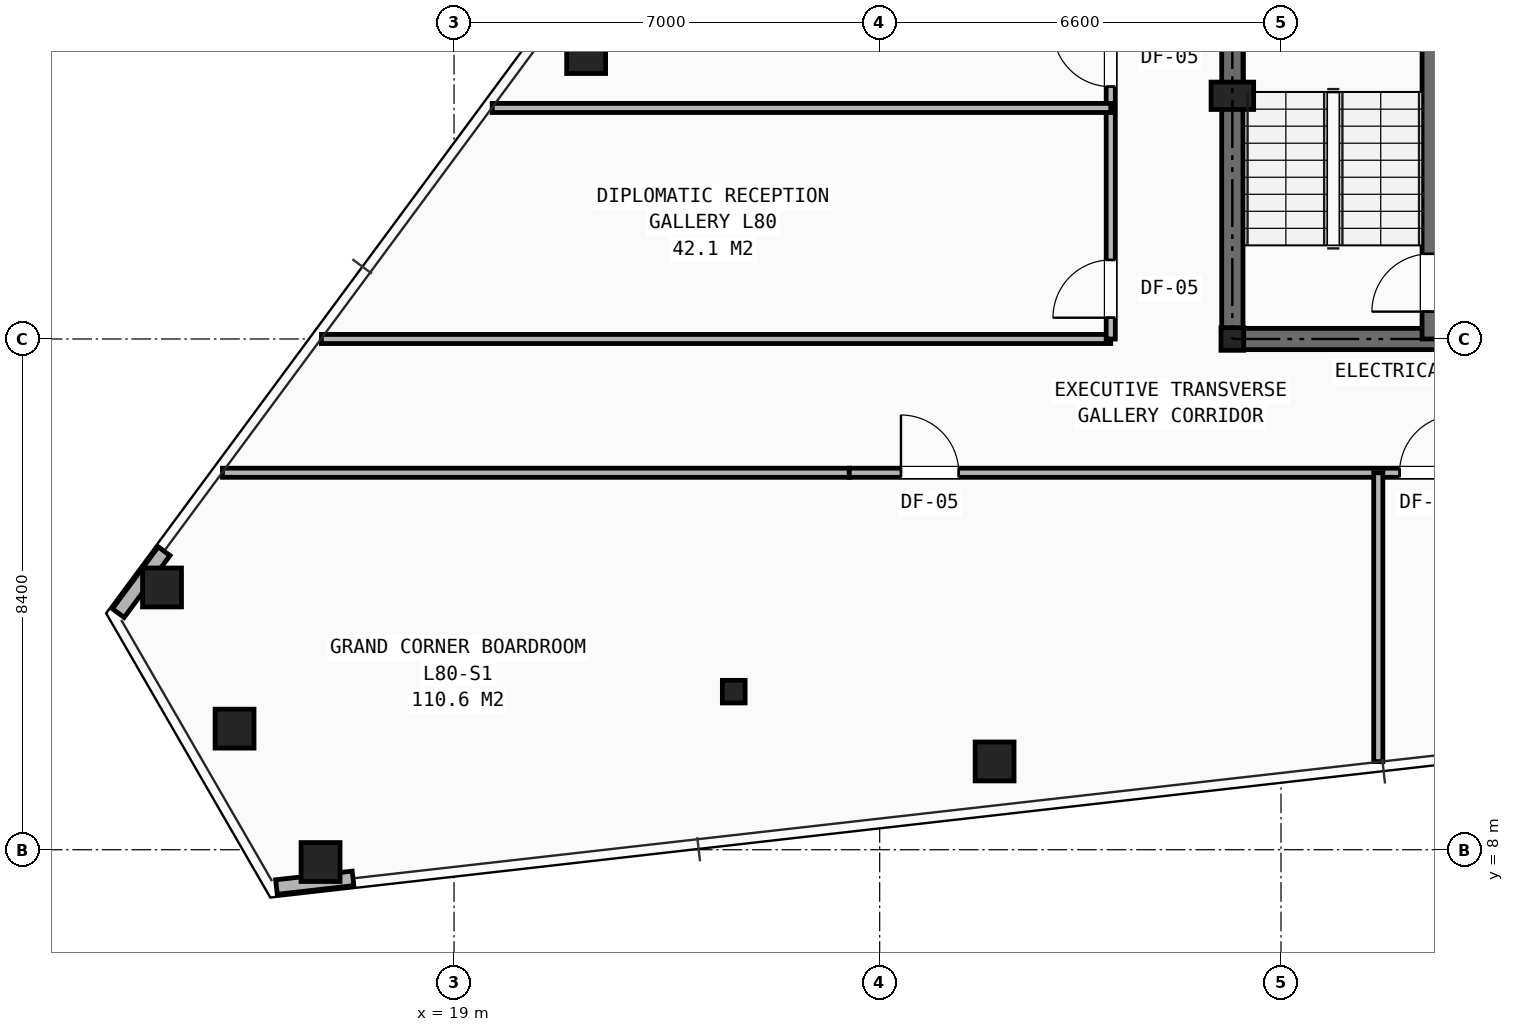
"""IFC4 building model, lengths in metres.
Left out: names, types, materials, properties, quantities, classifications, styles, units other than length and angle.
Written with IfcOpenShell. Run it as: python <this file> out.ifc"""

import sys

from ifc_helpers import new_model, si_unit, direction, frame, frame_2d, origin, origin_2d, place, context, subcontext, project, spatial, rectangle, hollow_rectangle, i_section, extrude, element, fill, save


model = new_model("IFC4")
c1 = context("Model", 3, precision=1e-05, world=origin(), true_north=direction((0.0, 1.0)))
c2 = subcontext(c1, "Body", "Model", "MODEL_VIEW")
j1 = project(units=[si_unit("LENGTHUNIT", "METRE"), si_unit("PLANEANGLEUNIT", "RADIAN")], contexts=[c1])
p1 = place(None, origin())
s1 = spatial("IfcSite", under=j1, at=p1, CompositionType="ELEMENT")
p2 = place(p1, origin())
s2 = spatial("IfcBuilding", under=s1, at=p2, CompositionType="ELEMENT")
p3 = place(p2, frame((0.0, 0.0, 283.0)))
s3 = spatial("IfcBuildingStorey", under=s2, at=p3, CompositionType="ELEMENT", Elevation=283.0)
for number, where, z_axis, x_axis in (
    (1, (31.8, 16.4, 0.0), (0.0, 0.0, 1.0), (1.0, 0.0, 0.0)),
    (2, (23.6, 10.6, 0.0), (0.0, 0.0, 1.0), (1.0, 0.0, 0.0)),
):
    element("IfcColumn", number, at=place(p3, frame(where, z_axis=z_axis, x_axis=x_axis)), inside=s3, PredefinedType="COLUMN", context=c2, shape_type="SweptSolid", body=[
        extrude(i_section(OverallWidth=0.374, OverallDepth=0.372, WebThickness=0.016, FlangeThickness=0.026, at=origin_2d()), origin(), (0.0, 0.0, 1.0), 3.5),
    ])
p4 = place(p3, frame((31.8, 20.4, 0.0), z_axis=(0.0, 0.0, 1.0), x_axis=(1.0, 0.0, 0.0)))
e3 = element("IfcColumn", 3, at=p4, inside=s3, PredefinedType="PILASTER", context=c2, shape_type="SweptSolid", body=[
    extrude(rectangle(XDim=0.7, YDim=0.45, at=origin_2d()), origin(), (0.0, 0.0, 1.0), 3.5),
])
for number, where, z_axis, x_axis in (
    (4, (21.173, 21.086, 0.0), (0.0, 0.0, 1.0), (1.0, 0.0, 0.0)),
    (5, (14.198, 12.313, 0.0), (0.0, 0.0, 1.0), (1.0, 0.0, 0.0)),
    (6, (15.39, 9.992, 0.0), (0.0, 0.0, 1.0), (1.0, 0.0, 0.0)),
    (7, (16.805, 7.798, 0.0), (0.0, 0.0, 1.0), (1.0, 0.0, 0.0)),
    (8, (27.89, 9.452, 0.0), (0.0, 0.0, 1.0), (1.0, 0.0, 0.0)),
):
    element("IfcColumn", number, at=place(p3, frame(where, z_axis=z_axis, x_axis=x_axis)), inside=s3, PredefinedType="COLUMN", context=c2, shape_type="SweptSolid", body=[
        extrude(hollow_rectangle(XDim=0.64, YDim=0.64, WallThickness=0.045, at=origin_2d()), origin(), (0.0, 0.0, 1.0), 3.5),
    ])
p5 = place(p3, frame((14.232, 12.91, 0.0), z_axis=(0.0, 0.0, 1.0), x_axis=(-0.594499388503, -0.804096062091, 0.0)))
e9 = element("IfcWall", 9, at=p5, inside=s3, PredefinedType="SHEAR", context=c2, shape_type="SweptSolid", body=[
    extrude(rectangle(XDim=1.267, YDim=0.24, at=frame_2d((0.634, 0.0))), origin(), (0.0, 0.0, 1.0), 2.623),
])
p6 = place(p3, frame((16.079, 7.386, 0.0), z_axis=(0.0, 0.0, 1.0), x_axis=(0.993610655419, 0.11286215237, 0.0)))
e10 = element("IfcWall", 10, at=p6, inside=s3, PredefinedType="SHEAR", context=c2, shape_type="SweptSolid", body=[
    extrude(rectangle(XDim=1.268, YDim=0.24, at=frame_2d((0.634, 0.0))), origin(), (0.0, 0.0, 1.0), 2.623),
])
p7 = place(p3, frame((31.8, 16.4, 0.0), z_axis=(0.0, 0.0, 1.0), x_axis=(1.0, 0.0, 0.0)))
e11 = element("IfcWall", 11, at=p7, inside=s3, PredefinedType="SHEAR", context=c2, shape_type="SweptSolid", body=[
    extrude(rectangle(XDim=16.4, YDim=0.35, at=frame_2d((8.2, 0.0))), origin(), (0.0, 0.0, 1.0), 3.25),
])
p8 = place(p7, frame((7.75, 0.0, 0.0)))
e12 = element("IfcOpeningElement", 12, at=p8, cuts=e11, PredefinedType="OPENING", context=c2, shape_type="SweptSolid", body=[
    extrude(rectangle(XDim=0.9, YDim=2.1, at=frame_2d((0.45, 1.05))), frame((0.0, 0.185, 0.0), z_axis=(0.0, -1.0, 0.0), x_axis=(1.0, 0.0, 0.0)), (0.0, 0.0, 1.0), 0.37),
])
p9 = place(p7, frame((4.2, 0.0, 0.0)))
e13 = element("IfcOpeningElement", 13, at=p9, cuts=e11, PredefinedType="OPENING", context=c2, shape_type="SweptSolid", body=[
    extrude(rectangle(XDim=0.95, YDim=2.1, at=frame_2d((0.475, 1.05))), frame((0.0, 0.185, 0.0), z_axis=(0.0, -1.0, 0.0), x_axis=(1.0, 0.0, 0.0)), (0.0, 0.0, 1.0), 0.37),
])
p10 = place(p7, frame((10.6, 0.0, 0.0)))
e14 = element("IfcOpeningElement", 14, at=p10, cuts=e11, PredefinedType="OPENING", context=c2, shape_type="SweptSolid", body=[
    extrude(rectangle(XDim=0.95, YDim=2.1, at=frame_2d((0.475, 1.05))), frame((0.0, 0.185, 0.0), z_axis=(0.0, -1.0, 0.0), x_axis=(1.0, 0.0, 0.0)), (0.0, 0.0, 1.0), 0.37),
])
p11 = place(p3, frame((31.8, 16.4, 0.0), z_axis=(0.0, 0.0, 1.0), x_axis=(0.0, 1.0, 0.0)))
e15 = element("IfcWall", 15, at=p11, inside=s3, PredefinedType="SHEAR", context=c2, shape_type="SweptSolid", body=[
    extrude(rectangle(XDim=14.8, YDim=0.35, at=frame_2d((7.4, 0.0))), origin(), (0.0, 0.0, 1.0), 3.25),
])
p12 = place(p11, frame((11.0, 0.0, 0.0)))
e16 = element("IfcOpeningElement", 16, at=p12, cuts=e15, PredefinedType="OPENING", context=c2, shape_type="SweptSolid", body=[
    extrude(rectangle(XDim=1.1, YDim=2.15, at=frame_2d((0.55, 1.075))), frame((0.0, 0.185, 0.0), z_axis=(0.0, -1.0, 0.0), x_axis=(1.0, 0.0, 0.0)), (0.0, 0.0, 1.0), 0.37),
])
p13 = place(p3, frame((35.045, 16.4, 0.0), z_axis=(0.0, 0.0, 1.0), x_axis=(0.0, 1.0, 0.0)))
e17 = element("IfcWall", 17, at=p13, inside=s3, PredefinedType="SHEAR", context=c2, shape_type="SweptSolid", body=[
    extrude(rectangle(XDim=8.4, YDim=0.25, at=frame_2d((4.2, 0.0))), origin(), (0.0, 0.0, 1.0), 3.25),
])
p14 = place(p13, frame((0.45, 0.0, 0.0)))
e18 = element("IfcOpeningElement", 18, at=p14, cuts=e17, PredefinedType="OPENING", context=c2, shape_type="SweptSolid", body=[
    extrude(rectangle(XDim=0.95, YDim=2.1, at=frame_2d((0.475, 1.05))), frame((0.0, 0.135, 0.0), z_axis=(0.0, -1.0, 0.0), x_axis=(1.0, 0.0, 0.0)), (0.0, 0.0, 1.0), 0.27),
])
p15 = place(p3, frame((15.192, 14.2, 0.0), z_axis=(0.0, 0.0, 1.0), x_axis=(1.0, 0.0, 0.0)))
e19 = element("IfcWall", 19, at=p15, inside=s3, PredefinedType="PARTITIONING", context=c2, shape_type="SweptSolid", body=[
    extrude(rectangle(XDim=10.308, YDim=0.15, at=frame_2d((5.154, 0.0))), origin(), (0.0, 0.0, 1.0), 2.265),
])
p16 = place(p3, frame((16.818, 16.4, 0.0), z_axis=(0.0, 0.0, 1.0), x_axis=(1.0, 0.0, 0.0)))
e20 = element("IfcWall", 20, at=p16, inside=s3, PredefinedType="PARTITIONING", context=c2, shape_type="SweptSolid", body=[
    extrude(rectangle(XDim=12.982, YDim=0.15, at=frame_2d((6.491, 0.0))), origin(), (0.0, 0.0, 1.0), 2.265),
])
p17 = place(p3, frame((29.8, 16.4, 0.0), z_axis=(0.0, 0.0, 1.0), x_axis=(0.0, 1.0, 0.0)))
e21 = element("IfcWall", 21, at=p17, inside=s3, PredefinedType="PARTITIONING", context=c2, shape_type="SweptSolid", body=[
    extrude(rectangle(XDim=19.3, YDim=0.15, at=frame_2d((9.65, 0.0))), origin(), (0.0, 0.0, 1.0), 2.265),
])
p18 = place(p17, frame((0.35, 0.0, 0.0)))
e22 = element("IfcOpeningElement", 22, at=p18, cuts=e21, PredefinedType="OPENING", context=c2, shape_type="SweptSolid", body=[
    extrude(rectangle(XDim=0.95, YDim=2.1, at=frame_2d((0.475, 1.05))), frame((0.0, 0.085, 0.0), z_axis=(0.0, -1.0, 0.0), x_axis=(1.0, 0.0, 0.0)), (0.0, 0.0, 1.0), 0.17),
])
p19 = place(p17, frame((4.15, 0.0, 0.0)))
e23 = element("IfcOpeningElement", 23, at=p19, cuts=e21, PredefinedType="OPENING", context=c2, shape_type="SweptSolid", body=[
    extrude(rectangle(XDim=0.95, YDim=2.1, at=frame_2d((0.475, 1.05))), frame((0.0, 0.085, 0.0), z_axis=(0.0, -1.0, 0.0), x_axis=(1.0, 0.0, 0.0)), (0.0, 0.0, 1.0), 0.17),
])
p20 = place(p17, frame((9.45, 0.0, 0.0)))
e24 = element("IfcOpeningElement", 24, at=p20, cuts=e21, PredefinedType="OPENING", context=c2, shape_type="SweptSolid", body=[
    extrude(rectangle(XDim=0.95, YDim=2.1, at=frame_2d((0.475, 1.05))), frame((0.0, 0.085, 0.0), z_axis=(0.0, -1.0, 0.0), x_axis=(1.0, 0.0, 0.0)), (0.0, 0.0, 1.0), 0.17),
])
p21 = place(p3, frame((25.5, 14.2, 0.0), z_axis=(0.0, 0.0, 1.0), x_axis=(1.0, 0.0, 0.0)))
e25 = element("IfcWall", 25, at=p21, inside=s3, PredefinedType="PARTITIONING", context=c2, shape_type="SweptSolid", body=[
    extrude(rectangle(XDim=29.0, YDim=0.15, at=frame_2d((14.5, 0.0))), origin(), (0.0, 0.0, 1.0), 2.265),
])
p22 = place(p21, frame((0.85, 0.0, 0.0)))
e26 = element("IfcOpeningElement", 26, at=p22, cuts=e25, PredefinedType="OPENING", context=c2, shape_type="SweptSolid", body=[
    extrude(rectangle(XDim=0.95, YDim=2.1, at=frame_2d((0.475, 1.05))), frame((0.0, 0.085, 0.0), z_axis=(0.0, -1.0, 0.0), x_axis=(1.0, 0.0, 0.0)), (0.0, 0.0, 1.0), 0.17),
])
p23 = place(p21, frame((9.05, 0.0, 0.0)))
e27 = element("IfcOpeningElement", 27, at=p23, cuts=e25, PredefinedType="OPENING", context=c2, shape_type="SweptSolid", body=[
    extrude(rectangle(XDim=0.95, YDim=2.1, at=frame_2d((0.475, 1.05))), frame((0.0, 0.085, 0.0), z_axis=(0.0, -1.0, 0.0), x_axis=(1.0, 0.0, 0.0)), (0.0, 0.0, 1.0), 0.17),
])
p24 = place(p21, frame((14.45, 0.0, 0.0)))
e28 = element("IfcOpeningElement", 28, at=p24, cuts=e25, PredefinedType="OPENING", context=c2, shape_type="SweptSolid", body=[
    extrude(rectangle(XDim=0.95, YDim=2.1, at=frame_2d((0.475, 1.05))), frame((0.0, 0.085, 0.0), z_axis=(0.0, -1.0, 0.0), x_axis=(1.0, 0.0, 0.0)), (0.0, 0.0, 1.0), 0.17),
])
p25 = place(p21, frame((18.85, 0.0, 0.0)))
e29 = element("IfcOpeningElement", 29, at=p25, cuts=e25, PredefinedType="OPENING", context=c2, shape_type="SweptSolid", body=[
    extrude(rectangle(XDim=0.95, YDim=2.1, at=frame_2d((0.475, 1.05))), frame((0.0, 0.085, 0.0), z_axis=(0.0, -1.0, 0.0), x_axis=(1.0, 0.0, 0.0)), (0.0, 0.0, 1.0), 0.17),
])
p26 = place(p3, frame((34.2, 9.449, 0.0), z_axis=(0.0, 0.0, 1.0), x_axis=(0.0, 1.0, 0.0)))
e30 = element("IfcWall", 30, at=p26, inside=s3, PredefinedType="PARTITIONING", context=c2, shape_type="SweptSolid", body=[
    extrude(rectangle(XDim=4.751, YDim=0.15, at=frame_2d((2.375, 0.0))), origin(), (0.0, 0.0, 1.0), 2.628),
])
p27 = place(p3, frame((19.628, 20.2, 0.0), z_axis=(0.0, 0.0, 1.0), x_axis=(1.0, 0.0, 0.0)))
e31 = element("IfcWall", 31, at=p27, inside=s3, PredefinedType="PARTITIONING", context=c2, shape_type="SweptSolid", body=[
    extrude(rectangle(XDim=10.172, YDim=0.15, at=frame_2d((5.086, 0.0))), origin(), (0.0, 0.0, 1.0), 2.265),
])
p28 = place(p14, origin())
e32 = element("IfcDoor", 32, at=p28, inside=s3, OperationType="SINGLE_SWING_LEFT", PredefinedType="DOOR", context=c2, shape_type="SweptSolid", body=[
    extrude(rectangle(XDim=0.95, YDim=2.1, at=frame_2d((0.475, 1.05))), frame((0.0, 0.025, 0.0), z_axis=(0.0, -1.0, 0.0), x_axis=(1.0, 0.0, 0.0)), (0.0, 0.0, 1.0), 0.05),
])
fill(e18, e32)
p29 = place(p22, origin())
e33 = element("IfcDoor", 33, at=p29, inside=s3, OperationType="SINGLE_SWING_LEFT", PredefinedType="DOOR", context=c2, shape_type="SweptSolid", body=[
    extrude(rectangle(XDim=0.95, YDim=2.1, at=frame_2d((0.475, 1.05))), frame((0.0, 0.025, 0.0), z_axis=(0.0, -1.0, 0.0), x_axis=(1.0, 0.0, 0.0)), (0.0, 0.0, 1.0), 0.05),
])
fill(e26, e33)
p30 = place(p23, origin())
e34 = element("IfcDoor", 34, at=p30, inside=s3, OperationType="SINGLE_SWING_RIGHT", PredefinedType="DOOR", context=c2, shape_type="SweptSolid", body=[
    extrude(rectangle(XDim=0.95, YDim=2.1, at=frame_2d((0.475, 1.05))), frame((0.0, 0.025, 0.0), z_axis=(0.0, -1.0, 0.0), x_axis=(1.0, 0.0, 0.0)), (0.0, 0.0, 1.0), 0.05),
])
fill(e27, e34)
p31 = place(p18, origin())
e35 = element("IfcDoor", 35, at=p31, inside=s3, OperationType="SINGLE_SWING_LEFT", PredefinedType="DOOR", context=c2, shape_type="SweptSolid", body=[
    extrude(rectangle(XDim=0.95, YDim=2.1, at=frame_2d((0.475, 1.05))), frame((0.0, 0.025, 0.0), z_axis=(0.0, -1.0, 0.0), x_axis=(1.0, 0.0, 0.0)), (0.0, 0.0, 1.0), 0.05),
])
fill(e22, e35)
p32 = place(p19, origin())
e36 = element("IfcDoor", 36, at=p32, inside=s3, OperationType="SINGLE_SWING_RIGHT", PredefinedType="DOOR", context=c2, shape_type="SweptSolid", body=[
    extrude(rectangle(XDim=0.95, YDim=2.1, at=frame_2d((0.475, 1.05))), frame((0.0, 0.025, 0.0), z_axis=(0.0, -1.0, 0.0), x_axis=(1.0, 0.0, 0.0)), (0.0, 0.0, 1.0), 0.05),
])
fill(e23, e36)
save(model, sys.argv[1])
